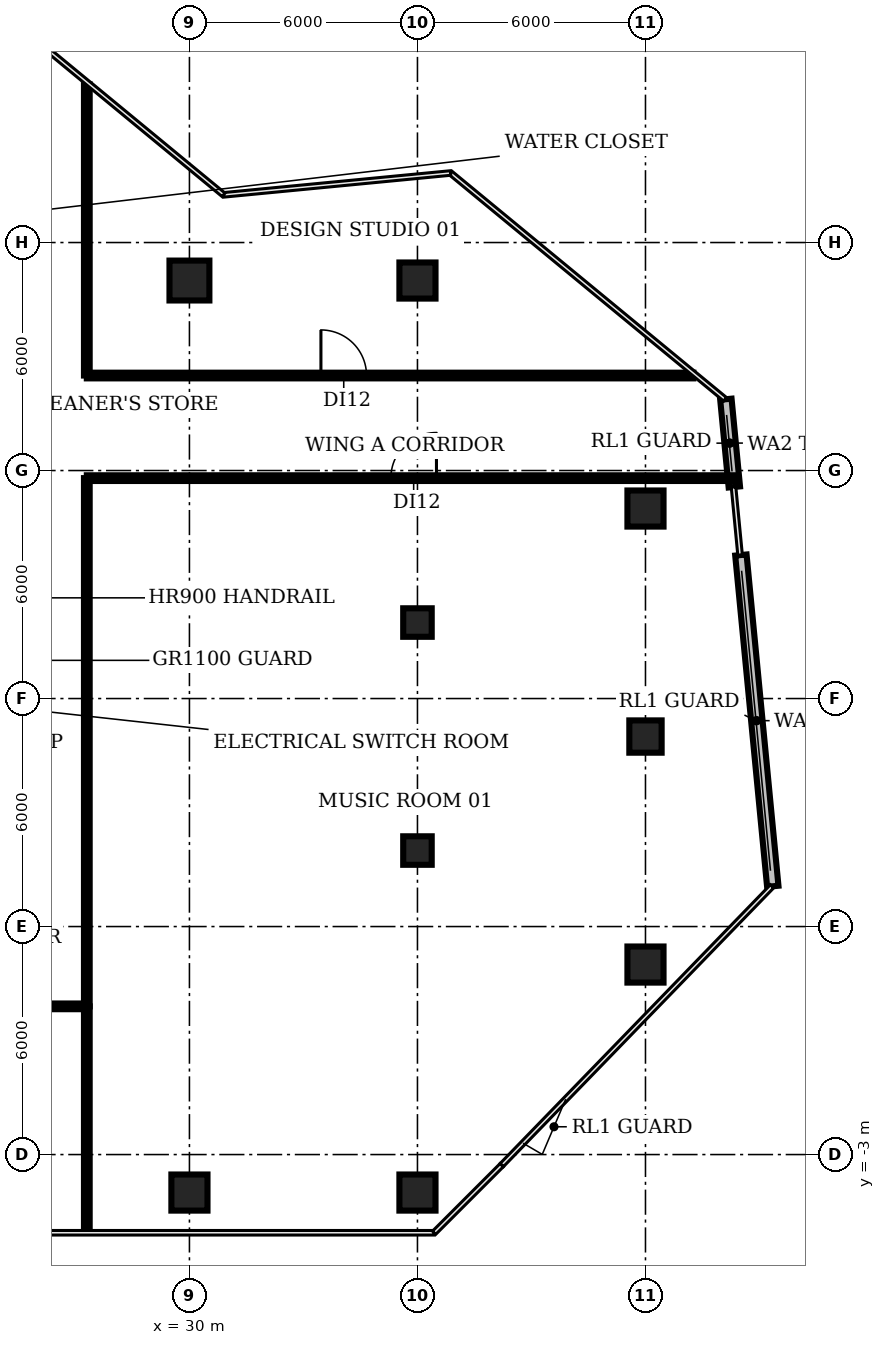
"""IFC4 building model, lengths in metres.
Left out: names, types, materials, properties, quantities, classifications, styles, units other than length and angle.
Written with IfcOpenShell. Run it as: python <this file> out.ifc"""

import sys

from ifc_helpers import new_model, si_unit, direction, frame, frame_2d, origin, origin_2d, place, context, subcontext, project, spatial, rectangle, circle, extrude, element, fill, save


model = new_model("IFC4")
c1 = context("Model", 3, precision=1e-05, world=origin(), true_north=direction((0.0, 1.0)))
c2 = subcontext(c1, "Body", "Model", "MODEL_VIEW")
j1 = project(units=[si_unit("LENGTHUNIT", "METRE"), si_unit("PLANEANGLEUNIT", "RADIAN")], contexts=[c1])
p1 = place(None, origin())
s1 = spatial("IfcSite", under=j1, at=p1, CompositionType="ELEMENT")
p2 = place(p1, origin())
s2 = spatial("IfcBuilding", under=s1, at=p2, CompositionType="ELEMENT")
p3 = place(p2, frame((0.0, 0.0, 192.8)))
s3 = spatial("IfcBuildingStorey", under=s2, at=p3, CompositionType="ELEMENT", Elevation=192.8)
p4 = place(p3, frame((30.0, -4.0, 0.0), z_axis=(0.0, 0.0, 1.0), x_axis=(1.0, 0.0, 0.0)))
e1 = element("IfcColumn", 1, at=p4, inside=s3, PredefinedType="COLUMN", context=c2, shape_type="SweptSolid", body=[
    extrude(rectangle(XDim=0.95, YDim=0.95, at=origin_2d()), origin(), (0.0, 0.0, 1.0), 3.2),
])
p5 = place(p3, frame((30.0, 20.0, 0.0), z_axis=(0.0, 0.0, 1.0), x_axis=(1.0, 0.0, 0.0)))
e2 = element("IfcColumn", 2, at=p5, inside=s3, PredefinedType="COLUMN", context=c2, shape_type="SweptSolid", body=[
    extrude(circle(Radius=0.525, at=origin_2d()), origin(), (0.0, 0.0, 1.0), 3.2),
])
p6 = place(p3, frame((36.0, -4.0, 0.0), z_axis=(0.0, 0.0, 1.0), x_axis=(1.0, 0.0, 0.0)))
e3 = element("IfcColumn", 3, at=p6, inside=s3, PredefinedType="COLUMN", context=c2, shape_type="SweptSolid", body=[
    extrude(circle(Radius=0.475, at=origin_2d()), origin(), (0.0, 0.0, 1.0), 3.8),
])
for number, where, z_axis, x_axis in (
    (4, (36.0, 5.0, 0.0), (0.0, 0.0, 1.0), (1.0, 0.0, 0.0)),
    (5, (36.0, 11.0, 0.0), (0.0, 0.0, 1.0), (1.0, 0.0, 0.0)),
):
    element("IfcColumn", number, at=place(p3, frame(where, z_axis=z_axis, x_axis=x_axis)), inside=s3, PredefinedType="COLUMN", context=c2, shape_type="SweptSolid", body=[
        extrude(rectangle(XDim=0.75, YDim=0.75, at=origin_2d()), origin(), (0.0, 0.0, 1.0), 3.8),
    ])
for number, where, z_axis, x_axis in (
    (6, (36.0, 20.0, 0.0), (0.0, 0.0, 1.0), (1.0, 0.0, 0.0)),
    (7, (42.0, 2.0, 0.0), (0.0, 0.0, 1.0), (1.0, 0.0, 0.0)),
):
    element("IfcColumn", number, at=place(p3, frame(where, z_axis=z_axis, x_axis=x_axis)), inside=s3, PredefinedType="COLUMN", context=c2, shape_type="SweptSolid", body=[
        extrude(circle(Radius=0.475, at=origin_2d()), origin(), (0.0, 0.0, 1.0), 3.8),
    ])
p7 = place(p3, frame((42.0, 8.0, 0.0), z_axis=(0.0, 0.0, 1.0), x_axis=(1.0, 0.0, 0.0)))
e8 = element("IfcColumn", 8, at=p7, inside=s3, PredefinedType="COLUMN", context=c2, shape_type="SweptSolid", body=[
    extrude(rectangle(XDim=0.85, YDim=0.85, at=origin_2d()), origin(), (0.0, 0.0, 1.0), 3.8),
])
p8 = place(p3, frame((42.0, 14.0, 0.0), z_axis=(0.0, 0.0, 1.0), x_axis=(1.0, 0.0, 0.0)))
e9 = element("IfcColumn", 9, at=p8, inside=s3, PredefinedType="COLUMN", context=c2, shape_type="SweptSolid", body=[
    extrude(circle(Radius=0.475, at=origin_2d()), origin(), (0.0, 0.0, 1.0), 3.8),
])
p9 = place(p3, frame((45.35, 4.06, 0.0), z_axis=(0.0, 0.0, 1.0), x_axis=(-0.095845739651, 0.995396199606, 0.0)))
e10 = element("IfcWall", 10, at=p9, inside=s3, PredefinedType="SOLIDWALL", context=c2, shape_type="SweptSolid", body=[
    extrude(rectangle(XDim=8.757, YDim=0.3, at=frame_2d((4.379, 0.0))), origin(), (0.0, 0.0, 1.0), 3.8),
])
p10 = place(p3, frame((44.338, 14.568, 0.0), z_axis=(0.0, 0.0, 1.0), x_axis=(-0.095802677318, 0.995400345097, 0.0)))
e11 = element("IfcWall", 11, at=p10, inside=s3, PredefinedType="SOLIDWALL", context=c2, shape_type="SweptSolid", body=[
    extrude(rectangle(XDim=2.319, YDim=0.3, at=frame_2d((1.16, 0.0))), origin(), (0.0, 0.0, 1.0), 3.8),
])
p11 = place(p3, frame((27.3, -5.01, 0.0), z_axis=(0.0, 0.0, 1.0), x_axis=(0.0, 1.0, 0.0)))
e12 = element("IfcWall", 12, at=p11, inside=s3, PredefinedType="PARTITIONING", context=c2, shape_type="SweptSolid", body=[
    extrude(rectangle(XDim=5.91, YDim=0.15, at=frame_2d((2.955, 0.0))), origin(), (0.0, 0.0, 1.0), 2.83),
])
p12 = place(p3, frame((27.3, 0.9, 0.0), z_axis=(0.0, 0.0, 1.0), x_axis=(-1.0, 0.0, 0.0)))
e13 = element("IfcWall", 13, at=p12, inside=s3, PredefinedType="PARTITIONING", context=c2, shape_type="SweptSolid", body=[
    extrude(rectangle(XDim=24.6, YDim=0.15, at=frame_2d((12.3, 0.0))), origin(), (0.0, 0.0, 1.0), 2.83),
])
p13 = place(p12, frame((11.8, 0.0, 0.0)))
e14 = element("IfcOpeningElement", 14, at=p13, cuts=e13, PredefinedType="OPENING", context=c2, shape_type="SweptSolid", body=[
    extrude(rectangle(XDim=1.2, YDim=2.1, at=frame_2d((0.6, 1.05))), frame((0.0, 0.085, 0.0), z_axis=(0.0, -1.0, 0.0), x_axis=(1.0, 0.0, 0.0)), (0.0, 0.0, 1.0), 0.17),
])
p14 = place(p3, frame((27.3, 0.9, 0.0), z_axis=(0.0, 0.0, 1.0), x_axis=(0.0, 1.0, 0.0)))
e15 = element("IfcWall", 15, at=p14, inside=s3, PredefinedType="PARTITIONING", context=c2, shape_type="SweptSolid", body=[
    extrude(rectangle(XDim=13.9, YDim=0.15, at=frame_2d((6.95, 0.0))), origin(), (0.0, 0.0, 1.0), 2.83),
])
p15 = place(p3, frame((27.3, 14.8, 0.0), z_axis=(0.0, 0.0, 1.0), x_axis=(1.0, 0.0, 0.0)))
e16 = element("IfcWall", 16, at=p15, inside=s3, PredefinedType="PARTITIONING", context=c2, shape_type="SweptSolid", body=[
    extrude(rectangle(XDim=17.055, YDim=0.15, at=frame_2d((8.527, 0.0))), origin(), (0.0, 0.0, 1.0), 2.83),
])
p16 = place(p15, frame((8.0, 0.0, 0.0)))
e17 = element("IfcOpeningElement", 17, at=p16, cuts=e16, PredefinedType="OPENING", context=c2, shape_type="SweptSolid", body=[
    extrude(rectangle(XDim=1.2, YDim=2.1, at=frame_2d((0.6, 1.05))), frame((0.0, 0.085, 0.0), z_axis=(0.0, -1.0, 0.0), x_axis=(1.0, 0.0, 0.0)), (0.0, 0.0, 1.0), 0.17),
])
p17 = place(p3, frame((27.3, 17.5, 0.0), z_axis=(0.0, 0.0, 1.0), x_axis=(0.0, 1.0, 0.0)))
e18 = element("IfcWall", 18, at=p17, inside=s3, PredefinedType="PARTITIONING", context=c2, shape_type="SweptSolid", body=[
    extrude(rectangle(XDim=7.66, YDim=0.15, at=frame_2d((3.83, 0.0))), origin(), (0.0, 0.0, 1.0), 2.83),
])
p18 = place(p3, frame((27.3, 17.5, 0.0), z_axis=(0.0, 0.0, 1.0), x_axis=(1.0, 0.0, 0.0)))
e19 = element("IfcWall", 19, at=p18, inside=s3, PredefinedType="PARTITIONING", context=c2, shape_type="SweptSolid", body=[
    extrude(rectangle(XDim=15.96, YDim=0.15, at=frame_2d((7.98, 0.0))), origin(), (0.0, 0.0, 1.0), 2.83),
])
p19 = place(p18, frame((6.16, 0.0, 0.0)))
e20 = element("IfcOpeningElement", 20, at=p19, cuts=e19, PredefinedType="OPENING", context=c2, shape_type="SweptSolid", body=[
    extrude(rectangle(XDim=1.2, YDim=2.1, at=frame_2d((0.6, 1.05))), frame((0.0, 0.085, 0.0), z_axis=(0.0, -1.0, 0.0), x_axis=(1.0, 0.0, 0.0)), (0.0, 0.0, 1.0), 0.17),
])
p20 = place(p16, origin())
e21 = element("IfcDoor", 21, at=p20, inside=s3, OperationType="SINGLE_SWING_RIGHT", PredefinedType="DOOR", context=c2, shape_type="SweptSolid", body=[
    extrude(rectangle(XDim=1.2, YDim=2.1, at=frame_2d((0.6, 1.05))), frame((0.0, 0.025, 0.0), z_axis=(0.0, -1.0, 0.0), x_axis=(1.0, 0.0, 0.0)), (0.0, 0.0, 1.0), 0.05),
])
fill(e17, e21)
p21 = place(p19, origin())
e22 = element("IfcDoor", 22, at=p21, inside=s3, OperationType="SINGLE_SWING_LEFT", PredefinedType="DOOR", context=c2, shape_type="SweptSolid", body=[
    extrude(rectangle(XDim=1.2, YDim=2.1, at=frame_2d((0.6, 1.05))), frame((0.0, 0.025, 0.0), z_axis=(0.0, -1.0, 0.0), x_axis=(1.0, 0.0, 0.0)), (0.0, 0.0, 1.0), 0.05),
])
fill(e20, e22)
save(model, sys.argv[1])
